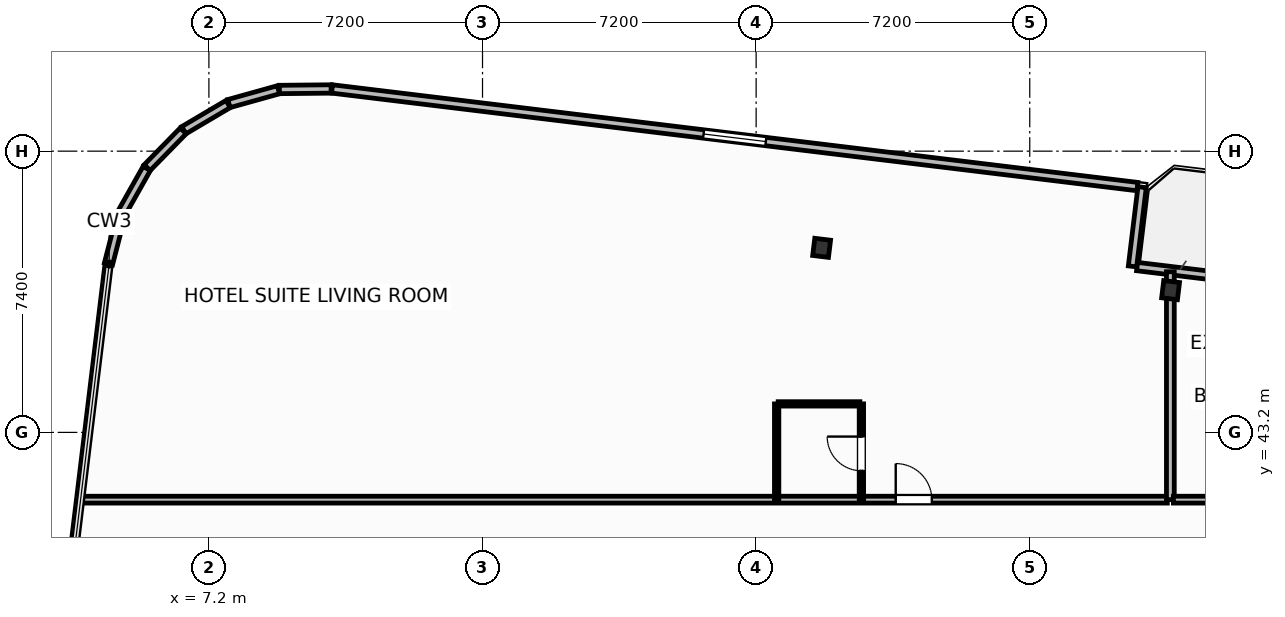
"""IFC4 building model, lengths in metres.
Left out: names, types, materials, properties, quantities, classifications, styles, units other than length and angle.
Written with IfcOpenShell. Run it as: python <this file> out.ifc"""

import sys

from ifc_helpers import new_model, si_unit, direction, frame, frame_2d, origin, origin_2d, place, context, subcontext, project, spatial, rectangle, i_section, extrude, element, fill, save


model = new_model("IFC4")
c1 = context("Model", 3, precision=1e-05, world=origin(), true_north=direction((0.0, 1.0)))
c2 = subcontext(c1, "Body", "Model", "MODEL_VIEW")
j1 = project(units=[si_unit("LENGTHUNIT", "METRE"), si_unit("PLANEANGLEUNIT", "RADIAN")], contexts=[c1])
p1 = place(None, origin())
s1 = spatial("IfcSite", under=j1, at=p1, CompositionType="ELEMENT")
p2 = place(p1, origin())
s2 = spatial("IfcBuilding", under=s1, at=p2, CompositionType="ELEMENT")
p3 = place(p2, frame((0.0, 0.0, 129.1)))
s3 = spatial("IfcBuildingStorey", under=s2, at=p3, CompositionType="ELEMENT", Elevation=129.1)
for number, where, z_axis, x_axis in (
    (1, (32.506, 46.943, 0.0), (0.0, 0.0, 1.0), (0.993, -0.12, 0.0)),
    (2, (23.323, 48.056, 0.0), (0.0, 0.0, 1.0), (0.993, -0.12, 0.0)),
):
    element("IfcColumn", number, at=place(p3, frame(where, z_axis=z_axis, x_axis=x_axis)), inside=s3, PredefinedType="COLUMN", context=c2, shape_type="SweptSolid", body=[
        extrude(i_section(OverallWidth=0.418, OverallDepth=0.455, WebThickness=0.042, FlangeThickness=0.068, FilletRadius=0.025, at=origin_2d()), origin(), (0.0, 0.0, 1.0), 3.7),
    ])
p4 = place(p3, frame((31.624, 47.563, 0.0), z_axis=(0.0, 0.0, 1.0), x_axis=(0.992729951822, -0.120362962556, 0.0)))
e3 = element("IfcWall", 3, at=p4, inside=s3, PredefinedType="SOLIDWALL", context=c2, shape_type="SweptSolid", body=[
    extrude(rectangle(XDim=6.0, YDim=0.22, at=frame_2d((3.0, 0.0))), origin(), (0.0, 0.0, 1.0), 2.73),
])
p5 = place(p4, frame((2.176, 0.0, 0.0)))
e4 = element("IfcOpeningElement", 4, at=p5, cuts=e3, PredefinedType="OPENING", context=c2, shape_type="SweptSolid", body=[
    extrude(rectangle(XDim=1.5, YDim=2.25, at=frame_2d((0.75, 1.125))), frame((0.0, 0.12, 0.0), z_axis=(0.0, -1.0, 0.0), x_axis=(1.0, 0.0, 0.0)), (0.0, 0.0, 1.0), 0.24),
])
p6 = place(p3, frame((31.504, 47.568, 0.0), z_axis=(0.0, 0.0, 1.0), x_axis=(0.120341784665, 0.992732519294, 0.0)))
e5 = element("IfcWall", 5, at=p6, inside=s3, PredefinedType="SOLIDWALL", context=c2, shape_type="SweptSolid", body=[
    extrude(rectangle(XDim=2.1, YDim=0.22, at=frame_2d((1.05, 0.0))), origin(), (0.0, 0.0, 1.0), 2.73),
])
p7 = place(p3, frame((31.633, 49.668, 0.0), z_axis=(0.0, 0.0, 1.0), x_axis=(-0.992731670483, 0.120348786531, 0.0)))
e6 = element("IfcWall", 6, at=p7, inside=s3, PredefinedType="SOLIDWALL", context=c2, shape_type="SweptSolid", body=[
    extrude(rectangle(XDim=21.347, YDim=0.22, at=frame_2d((10.674, 0.0))), origin(), (0.0, 0.0, 1.0), 2.73),
])
p8 = place(p7, frame((9.849, 0.0, 0.8)))
e7 = element("IfcOpeningElement", 7, at=p8, cuts=e6, PredefinedType="OPENING", context=c2, shape_type="SweptSolid", body=[
    extrude(rectangle(XDim=1.65, YDim=1.65, at=frame_2d((0.825, 0.825))), frame((0.0, 0.12, 0.0), z_axis=(0.0, -1.0, 0.0), x_axis=(1.0, 0.0, 0.0)), (0.0, 0.0, 1.0), 0.24),
])
p9 = place(p3, frame((10.416, 52.237, 0.0), z_axis=(0.0, 0.0, 1.0), x_axis=(-0.999947718056, -0.010225514878, 0.0)))
e8 = element("IfcWall", 8, at=p9, inside=s3, PredefinedType="SOLIDWALL", context=c2, shape_type="SweptSolid", body=[
    extrude(rectangle(XDim=1.361, YDim=0.22, at=frame_2d((0.68, 0.0))), origin(), (0.0, 0.0, 1.0), 2.73),
])
for number, where, z_axis, x_axis in (
    (9, (9.031, 52.216, 0.0), (0.0, 0.0, 1.0), (-0.963, -0.269, 0.0)),
    (10, (7.706, 51.84, 0.0), (0.0, 0.0, 1.0), (-0.861, -0.509, 0.0)),
):
    element("IfcWall", number, at=place(p3, frame(where, z_axis=z_axis, x_axis=x_axis)), inside=s3, PredefinedType="SOLIDWALL", context=c2, shape_type="SweptSolid", body=[
        extrude(rectangle(XDim=1.353, YDim=0.22, at=frame_2d((0.677, 0.0))), origin(), (0.0, 0.0, 1.0), 2.73),
    ])
p10 = place(p3, frame((6.523, 51.133, 0.0), z_axis=(0.0, 0.0, 1.0), x_axis=(-0.699762925925, -0.714375144795, 0.0)))
e11 = element("IfcWall", 11, at=p10, inside=s3, PredefinedType="SOLIDWALL", context=c2, shape_type="SweptSolid", body=[
    extrude(rectangle(XDim=1.353, YDim=0.22, at=frame_2d((0.677, 0.0))), origin(), (0.0, 0.0, 1.0), 2.73),
])
p11 = place(p3, frame((5.564, 50.145, 0.0), z_axis=(0.0, 0.0, 1.0), x_axis=(-0.491117621399, -0.871093268227, 0.0)))
e12 = element("IfcWall", 12, at=p11, inside=s3, PredefinedType="SOLIDWALL", context=c2, shape_type="SweptSolid", body=[
    extrude(rectangle(XDim=1.353, YDim=0.22, at=frame_2d((0.677, 0.0))), origin(), (0.0, 0.0, 1.0), 2.73),
])
p12 = place(p3, frame((4.894, 48.942, 0.0), z_axis=(0.0, 0.0, 1.0), x_axis=(-0.248857256909, -0.968540172468, 0.0)))
e13 = element("IfcWall", 13, at=p12, inside=s3, PredefinedType="SOLIDWALL", context=c2, shape_type="SweptSolid", body=[
    extrude(rectangle(XDim=1.353, YDim=0.22, at=frame_2d((0.676, 0.0))), origin(), (0.0, 0.0, 1.0), 2.73),
])
p13 = place(p3, frame((3.864, 41.43, 0.0), z_axis=(0.0, 0.0, 1.0), x_axis=(1.0, 0.0, 0.0)))
e14 = element("IfcWall", 14, at=p13, inside=s3, PredefinedType="PARTITIONING", context=c2, shape_type="SweptSolid", body=[
    extrude(rectangle(XDim=28.556, YDim=0.18, at=frame_2d((14.278, 0.0))), origin(), (0.0, 0.0, 1.0), 3.45),
])
p14 = place(p13, frame((21.409, 0.0, 0.0)))
e15 = element("IfcOpeningElement", 15, at=p14, cuts=e14, PredefinedType="OPENING", context=c2, shape_type="SweptSolid", body=[
    extrude(rectangle(XDim=0.95, YDim=2.15, at=frame_2d((0.475, 1.075))), frame((0.0, 0.1, 0.0), z_axis=(0.0, -1.0, 0.0), x_axis=(1.0, 0.0, 0.0)), (0.0, 0.0, 1.0), 0.2),
])
p15 = place(p3, frame((22.18, 43.95, 0.0), z_axis=(0.0, 0.0, 1.0), x_axis=(1.0, 0.0, 0.0)))
e16 = element("IfcWall", 16, at=p15, inside=s3, PredefinedType="PARTITIONING", context=c2, shape_type="SweptSolid", body=[
    extrude(rectangle(XDim=2.15, YDim=0.115, at=frame_2d((1.075, 0.0))), origin(), (0.0, 0.0, 1.0), 3.45),
])
p16 = place(p3, frame((24.37, 41.43, 0.0), z_axis=(0.0, 0.0, 1.0), x_axis=(0.0, 1.0, 0.0)))
e17 = element("IfcWall", 17, at=p16, inside=s3, PredefinedType="PARTITIONING", context=c2, shape_type="SweptSolid", body=[
    extrude(rectangle(XDim=2.52, YDim=0.115, at=frame_2d((1.26, 0.0))), origin(), (0.0, 0.0, 1.0), 3.45),
])
p17 = place(p16, frame((0.76, 0.0, 0.0)))
e18 = element("IfcOpeningElement", 18, at=p17, cuts=e17, PredefinedType="OPENING", context=c2, shape_type="SweptSolid", body=[
    extrude(rectangle(XDim=0.9, YDim=2.05, at=frame_2d((0.45, 1.025))), frame((0.0, 0.067, 0.0), z_axis=(0.0, -1.0, 0.0), x_axis=(1.0, 0.0, 0.0)), (0.0, 0.0, 1.0), 0.135),
])
p18 = place(p3, frame((22.14, 41.43, 0.0), z_axis=(0.0, 0.0, 1.0), x_axis=(0.0, 1.0, 0.0)))
e19 = element("IfcWall", 19, at=p18, inside=s3, PredefinedType="PARTITIONING", context=c2, shape_type="SweptSolid", body=[
    extrude(rectangle(XDim=2.52, YDim=0.115, at=frame_2d((1.26, 0.0))), origin(), (0.0, 0.0, 1.0), 3.45),
])
p19 = place(p3, frame((32.5, 41.43, 0.0), z_axis=(0.0, 0.0, 1.0), x_axis=(0.0, 1.0, 0.0)))
e20 = element("IfcWall", 20, at=p19, inside=s3, PredefinedType="PARTITIONING", context=c2, shape_type="SweptSolid", body=[
    extrude(rectangle(XDim=5.997, YDim=0.205, at=frame_2d((2.999, 0.0))), origin(), (0.0, 0.0, 1.0), 2.662),
])
p20 = place(p3, frame((32.58, 41.43, 0.0), z_axis=(0.0, 0.0, 1.0), x_axis=(1.0, 0.0, 0.0)))
e21 = element("IfcWall", 21, at=p20, inside=s3, PredefinedType="PARTITIONING", context=c2, shape_type="SweptSolid", body=[
    extrude(rectangle(XDim=9.84, YDim=0.18, at=frame_2d((4.92, 0.0))), origin(), (0.0, 0.0, 1.0), 3.45),
])
p21 = place(p20, frame((5.68, 0.0, 0.0)))
e22 = element("IfcOpeningElement", 22, at=p21, cuts=e21, PredefinedType="OPENING", context=c2, shape_type="SweptSolid", body=[
    extrude(rectangle(XDim=0.95, YDim=2.15, at=frame_2d((0.475, 1.075))), frame((0.0, 0.1, 0.0), z_axis=(0.0, -1.0, 0.0), x_axis=(1.0, 0.0, 0.0)), (0.0, 0.0, 1.0), 0.2),
])
p22 = place(p8, origin())
e23 = element("IfcWindow", 23, at=p22, inside=s3, PartitioningType="SINGLE_PANEL", PredefinedType="WINDOW", context=c2, shape_type="SweptSolid", body=[
    extrude(rectangle(XDim=1.65, YDim=1.65, at=frame_2d((0.825, 0.825))), frame((0.0, 0.03, 0.0), z_axis=(0.0, -1.0, 0.0), x_axis=(1.0, 0.0, 0.0)), (0.0, 0.0, 1.0), 0.06),
])
fill(e7, e23)
p23 = place(p14, origin())
e24 = element("IfcDoor", 24, at=p23, inside=s3, OperationType="SINGLE_SWING_LEFT", PredefinedType="DOOR", context=c2, shape_type="SweptSolid", body=[
    extrude(rectangle(XDim=0.95, YDim=2.15, at=frame_2d((0.475, 1.075))), frame((0.0, 0.025, 0.0), z_axis=(0.0, -1.0, 0.0), x_axis=(1.0, 0.0, 0.0)), (0.0, 0.0, 1.0), 0.05),
])
fill(e15, e24)
p24 = place(p17, origin())
e25 = element("IfcDoor", 25, at=p24, inside=s3, OperationType="SINGLE_SWING_RIGHT", PredefinedType="DOOR", context=c2, shape_type="SweptSolid", body=[
    extrude(rectangle(XDim=0.9, YDim=2.05, at=frame_2d((0.45, 1.025))), frame((0.0, 0.025, 0.0), z_axis=(0.0, -1.0, 0.0), x_axis=(1.0, 0.0, 0.0)), (0.0, 0.0, 1.0), 0.05),
])
fill(e18, e25)
save(model, sys.argv[1])
